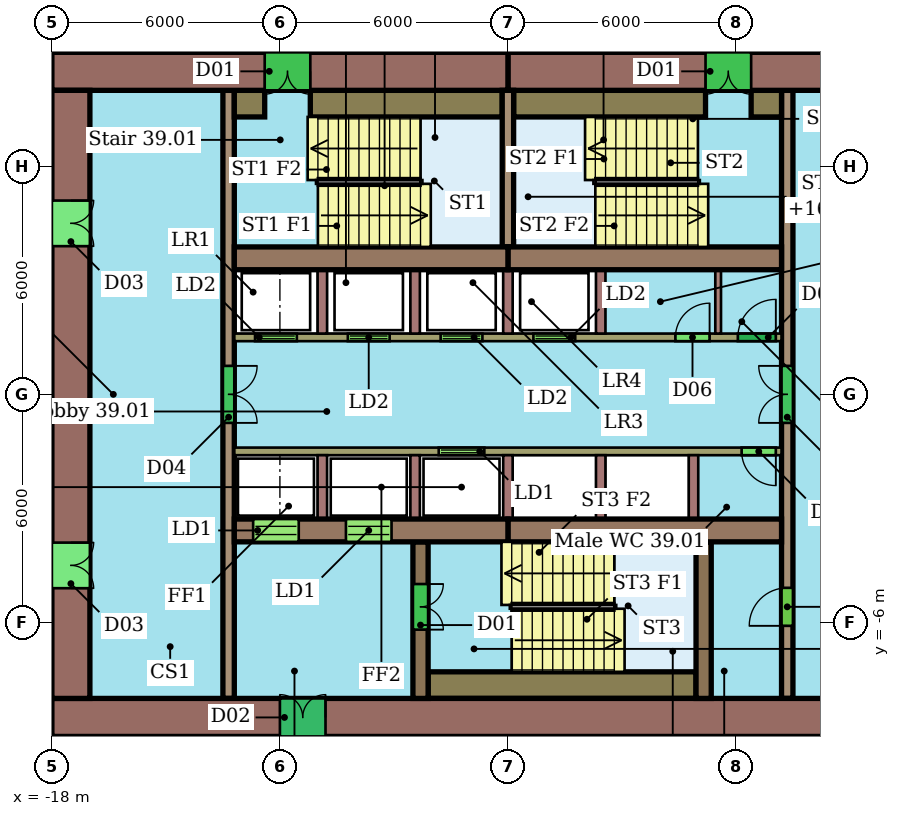
"""IFC4 building model, lengths in metres.
Left out: names, types, materials, properties, quantities, classifications, styles, units other than length and angle.
Written with IfcOpenShell. Run it as: python <this file> out.ifc"""

import sys

from ifc_helpers import new_model, si_unit, direction, frame, frame_2d, origin, place, context, subcontext, project, spatial, rectangle, extrude, element, fill, save


model = new_model("IFC4")
c1 = context("Model", 3, precision=1e-05, world=origin(), true_north=direction((0.0, 1.0)))
c2 = subcontext(c1, "Body", "Model", "MODEL_VIEW")
j1 = project(units=[si_unit("LENGTHUNIT", "METRE"), si_unit("PLANEANGLEUNIT", "RADIAN")], contexts=[c1])
p1 = place(None, origin())
s1 = spatial("IfcSite", under=j1, at=p1, CompositionType="ELEMENT")
p2 = place(p1, origin())
s2 = spatial("IfcBuilding", under=s1, at=p2, CompositionType="ELEMENT")
p3 = place(p2, frame((0.0, 0.0, 165.0)))
s3 = spatial("IfcBuildingStorey", under=s2, at=p3, CompositionType="ELEMENT", Elevation=165.0)
p4 = place(p3, frame((6.0, 8.5, 0.0), z_axis=(0.0, 0.0, 1.0), x_axis=(-1.0, 0.0, 0.0)))
e1 = element("IfcWall", 1, at=p4, inside=s3, PredefinedType="SHEAR", context=c2, shape_type="SweptSolid", body=[
    extrude(rectangle(XDim=12.0, YDim=1.0, at=frame_2d((6.0, 0.0))), origin(), (0.0, 0.0, 1.0), 3.3),
])
p5 = place(p4, frame((5.6, 0.0, 0.0)))
e2 = element("IfcOpeningElement", 2, at=p5, cuts=e1, PredefinedType="OPENING", context=c2, shape_type="SweptSolid", body=[
    extrude(rectangle(XDim=1.2, YDim=2.1, at=frame_2d((0.6, 1.05))), frame((0.0, 0.51, 0.0), z_axis=(0.0, -1.0, 0.0), x_axis=(1.0, 0.0, 0.0)), (0.0, 0.0, 1.0), 1.02),
])
p6 = place(p3, frame((-6.0, 8.5, 0.0), z_axis=(0.0, 0.0, 1.0), x_axis=(-1.0, 0.0, 0.0)))
e3 = element("IfcWall", 3, at=p6, inside=s3, PredefinedType="SHEAR", context=c2, shape_type="SweptSolid", body=[
    extrude(rectangle(XDim=12.0, YDim=1.0, at=frame_2d((6.0, 0.0))), origin(), (0.0, 0.0, 1.0), 3.3),
])
p7 = place(p6, frame((5.2, 0.0, 0.0)))
e4 = element("IfcOpeningElement", 4, at=p7, cuts=e3, PredefinedType="OPENING", context=c2, shape_type="SweptSolid", body=[
    extrude(rectangle(XDim=1.2, YDim=2.1, at=frame_2d((0.6, 1.05))), frame((0.0, 0.51, 0.0), z_axis=(0.0, -1.0, 0.0), x_axis=(1.0, 0.0, 0.0)), (0.0, 0.0, 1.0), 1.02),
])
p8 = place(p3, frame((-18.0, -8.5, 0.0), z_axis=(0.0, 0.0, 1.0), x_axis=(1.0, 0.0, 0.0)))
e5 = element("IfcWall", 5, at=p8, inside=s3, PredefinedType="SHEAR", context=c2, shape_type="SweptSolid", body=[
    extrude(rectangle(XDim=24.0, YDim=1.0, at=frame_2d((12.0, 0.0))), origin(), (0.0, 0.0, 1.0), 3.3),
])
p9 = place(p8, frame((6.0, 0.0, 0.0)))
e6 = element("IfcOpeningElement", 6, at=p9, cuts=e5, PredefinedType="OPENING", context=c2, shape_type="SweptSolid", body=[
    extrude(rectangle(XDim=1.2, YDim=2.1, at=frame_2d((0.6, 1.05))), frame((0.0, 0.51, 0.0), z_axis=(0.0, -1.0, 0.0), x_axis=(1.0, 0.0, 0.0)), (0.0, 0.0, 1.0), 1.02),
])
p10 = place(p3, frame((-17.5, 8.0, 0.0), z_axis=(0.0, 0.0, 1.0), x_axis=(0.0, -1.0, 0.0)))
e7 = element("IfcWall", 7, at=p10, inside=s3, PredefinedType="SHEAR", context=c2, shape_type="SweptSolid", body=[
    extrude(rectangle(XDim=16.0, YDim=1.0, at=frame_2d((8.0, 0.0))), origin(), (0.0, 0.0, 1.0), 3.3),
])
p11 = place(p10, frame((11.9, 0.0, 0.0)))
e8 = element("IfcOpeningElement", 8, at=p11, cuts=e7, PredefinedType="OPENING", context=c2, shape_type="SweptSolid", body=[
    extrude(rectangle(XDim=1.2, YDim=2.1, at=frame_2d((0.6, 1.05))), frame((0.0, 0.51, 0.0), z_axis=(0.0, -1.0, 0.0), x_axis=(1.0, 0.0, 0.0)), (0.0, 0.0, 1.0), 1.02),
])
p12 = place(p10, frame((2.9, 0.0, 0.0)))
e9 = element("IfcOpeningElement", 9, at=p12, cuts=e7, PredefinedType="OPENING", context=c2, shape_type="SweptSolid", body=[
    extrude(rectangle(XDim=1.2, YDim=2.1, at=frame_2d((0.6, 1.05))), frame((0.0, 0.51, 0.0), z_axis=(0.0, -1.0, 0.0), x_axis=(1.0, 0.0, 0.0)), (0.0, 0.0, 1.0), 1.02),
])
for number, where, z_axis, x_axis in (
    (10, (-13.2, 3.58, 0.0), (0.0, 0.0, 1.0), (1.0, 0.0, 0.0)),
    (11, (-6.0, 3.58, 0.0), (0.0, 0.0, 1.0), (1.0, 0.0, 0.0)),
):
    element("IfcWall", number, at=place(p3, frame(where, z_axis=z_axis, x_axis=x_axis)), inside=s3, PredefinedType="SHEAR", context=c2, shape_type="SweptSolid", body=[
        extrude(rectangle(XDim=7.2, YDim=0.6, at=frame_2d((3.6, 0.0))), origin(), (0.0, 0.0, 1.0), 3.3),
    ])
p13 = place(p3, frame((-13.2, -3.58, 0.0), z_axis=(0.0, 0.0, 1.0), x_axis=(1.0, 0.0, 0.0)))
e12 = element("IfcWall", 12, at=p13, inside=s3, PredefinedType="SHEAR", context=c2, shape_type="SweptSolid", body=[
    extrude(rectangle(XDim=7.2, YDim=0.6, at=frame_2d((3.6, 0.0))), origin(), (0.0, 0.0, 1.0), 3.3),
])
p14 = place(p13, frame((0.496, 0.0, 0.0)))
e13 = element("IfcOpeningElement", 13, at=p14, cuts=e12, PredefinedType="OPENING", context=c2, shape_type="SweptSolid", body=[
    extrude(rectangle(XDim=1.2, YDim=2.1, at=frame_2d((0.6, 1.05))), frame((0.0, 0.31, 0.0), z_axis=(0.0, -1.0, 0.0), x_axis=(1.0, 0.0, 0.0)), (0.0, 0.0, 1.0), 0.62),
])
p15 = place(p13, frame((2.938, 0.0, 0.0)))
e14 = element("IfcOpeningElement", 14, at=p15, cuts=e12, PredefinedType="OPENING", context=c2, shape_type="SweptSolid", body=[
    extrude(rectangle(XDim=1.2, YDim=2.1, at=frame_2d((0.6, 1.05))), frame((0.0, 0.31, 0.0), z_axis=(0.0, -1.0, 0.0), x_axis=(1.0, 0.0, 0.0)), (0.0, 0.0, 1.0), 0.62),
])
p16 = place(p3, frame((-6.0, -3.58, 0.0), z_axis=(0.0, 0.0, 1.0), x_axis=(1.0, 0.0, 0.0)))
e15 = element("IfcWall", 15, at=p16, inside=s3, PredefinedType="SHEAR", context=c2, shape_type="SweptSolid", body=[
    extrude(rectangle(XDim=7.2, YDim=0.6, at=frame_2d((3.6, 0.0))), origin(), (0.0, 0.0, 1.0), 3.3),
])
p17 = place(p3, frame((-13.35, 8.0, 0.0), z_axis=(0.0, 0.0, 1.0), x_axis=(0.0, -1.0, 0.0)))
e16 = element("IfcWall", 16, at=p17, inside=s3, PredefinedType="SHEAR", context=c2, shape_type="SweptSolid", body=[
    extrude(rectangle(XDim=16.0, YDim=0.3, at=frame_2d((8.0, 0.0))), origin(), (0.0, 0.0, 1.0), 3.3),
])
p18 = place(p17, frame((7.25, 0.0, 0.0)))
e17 = element("IfcOpeningElement", 17, at=p18, cuts=e16, PredefinedType="OPENING", context=c2, shape_type="SweptSolid", body=[
    extrude(rectangle(XDim=1.5, YDim=2.1, at=frame_2d((0.75, 1.05))), frame((0.0, 0.16, 0.0), z_axis=(0.0, -1.0, 0.0), x_axis=(1.0, 0.0, 0.0)), (0.0, 0.0, 1.0), 0.32),
])
p19 = place(p3, frame((1.35, -8.0, 0.0), z_axis=(0.0, 0.0, 1.0), x_axis=(0.0, 1.0, 0.0)))
e18 = element("IfcWall", 18, at=p19, inside=s3, PredefinedType="SHEAR", context=c2, shape_type="SweptSolid", body=[
    extrude(rectangle(XDim=16.0, YDim=0.3, at=frame_2d((8.0, 0.0))), origin(), (0.0, 0.0, 1.0), 3.3),
])
p20 = place(p19, frame((1.91, 0.0, 0.0)))
e19 = element("IfcOpeningElement", 19, at=p20, cuts=e18, PredefinedType="OPENING", context=c2, shape_type="SweptSolid", body=[
    extrude(rectangle(XDim=1.0, YDim=2.1, at=frame_2d((0.5, 1.05))), frame((0.0, 0.16, 0.0), z_axis=(0.0, -1.0, 0.0), x_axis=(1.0, 0.0, 0.0)), (0.0, 0.0, 1.0), 0.32),
])
p21 = place(p19, frame((7.25, 0.0, 0.0)))
e20 = element("IfcOpeningElement", 20, at=p21, cuts=e18, PredefinedType="OPENING", context=c2, shape_type="SweptSolid", body=[
    extrude(rectangle(XDim=1.5, YDim=2.1, at=frame_2d((0.75, 1.05))), frame((0.0, 0.16, 0.0), z_axis=(0.0, -1.0, 0.0), x_axis=(1.0, 0.0, 0.0)), (0.0, 0.0, 1.0), 0.32),
])
p22 = place(p3, frame((-13.2, 1.5, 0.0), z_axis=(0.0, 0.0, 1.0), x_axis=(1.0, 0.0, 0.0)))
e21 = element("IfcWall", 21, at=p22, inside=s3, PredefinedType="SHEAR", context=c2, shape_type="SweptSolid", body=[
    extrude(rectangle(XDim=14.4, YDim=0.2, at=frame_2d((7.2, 0.0))), origin(), (0.0, 0.0, 1.0), 3.3),
])
p23 = place(p22, frame((0.546, 0.0, 0.0)))
e22 = element("IfcOpeningElement", 22, at=p23, cuts=e21, PredefinedType="OPENING", context=c2, shape_type="SweptSolid", body=[
    extrude(rectangle(XDim=1.1, YDim=2.1, at=frame_2d((0.55, 1.05))), frame((0.0, 0.11, 0.0), z_axis=(0.0, -1.0, 0.0), x_axis=(1.0, 0.0, 0.0)), (0.0, 0.0, 1.0), 0.22),
])
p24 = place(p22, frame((2.988, 0.0, 0.0)))
e23 = element("IfcOpeningElement", 23, at=p24, cuts=e21, PredefinedType="OPENING", context=c2, shape_type="SweptSolid", body=[
    extrude(rectangle(XDim=1.1, YDim=2.1, at=frame_2d((0.55, 1.05))), frame((0.0, 0.11, 0.0), z_axis=(0.0, -1.0, 0.0), x_axis=(1.0, 0.0, 0.0)), (0.0, 0.0, 1.0), 0.22),
])
p25 = place(p22, frame((5.429, 0.0, 0.0)))
e24 = element("IfcOpeningElement", 24, at=p25, cuts=e21, PredefinedType="OPENING", context=c2, shape_type="SweptSolid", body=[
    extrude(rectangle(XDim=1.1, YDim=2.1, at=frame_2d((0.55, 1.05))), frame((0.0, 0.11, 0.0), z_axis=(0.0, -1.0, 0.0), x_axis=(1.0, 0.0, 0.0)), (0.0, 0.0, 1.0), 0.22),
])
p26 = place(p22, frame((7.871, 0.0, 0.0)))
e25 = element("IfcOpeningElement", 25, at=p26, cuts=e21, PredefinedType="OPENING", context=c2, shape_type="SweptSolid", body=[
    extrude(rectangle(XDim=1.1, YDim=2.1, at=frame_2d((0.55, 1.05))), frame((0.0, 0.11, 0.0), z_axis=(0.0, -1.0, 0.0), x_axis=(1.0, 0.0, 0.0)), (0.0, 0.0, 1.0), 0.22),
])
p27 = place(p22, frame((11.607, 0.0, 0.0)))
e26 = element("IfcOpeningElement", 26, at=p27, cuts=e21, PredefinedType="OPENING", context=c2, shape_type="SweptSolid", body=[
    extrude(rectangle(XDim=0.9, YDim=2.1, at=frame_2d((0.45, 1.05))), frame((0.0, 0.11, 0.0), z_axis=(0.0, -1.0, 0.0), x_axis=(1.0, 0.0, 0.0)), (0.0, 0.0, 1.0), 0.22),
])
p28 = place(p22, frame((13.25, 0.0, 0.0)))
e27 = element("IfcOpeningElement", 27, at=p28, cuts=e21, PredefinedType="OPENING", context=c2, shape_type="SweptSolid", body=[
    extrude(rectangle(XDim=1.0, YDim=2.1, at=frame_2d((0.5, 1.05))), frame((0.0, 0.11, 0.0), z_axis=(0.0, -1.0, 0.0), x_axis=(1.0, 0.0, 0.0)), (0.0, 0.0, 1.0), 0.22),
])
p29 = place(p3, frame((1.2, -1.5, 0.0), z_axis=(0.0, 0.0, 1.0), x_axis=(-1.0, 0.0, 0.0)))
e28 = element("IfcWall", 28, at=p29, inside=s3, PredefinedType="SHEAR", context=c2, shape_type="SweptSolid", body=[
    extrude(rectangle(XDim=14.4, YDim=0.2, at=frame_2d((7.2, 0.0))), origin(), (0.0, 0.0, 1.0), 3.3),
])
p30 = place(p29, frame((7.821, 0.0, 0.0)))
e29 = element("IfcOpeningElement", 29, at=p30, cuts=e28, PredefinedType="OPENING", context=c2, shape_type="SweptSolid", body=[
    extrude(rectangle(XDim=1.2, YDim=2.1, at=frame_2d((0.6, 1.05))), frame((0.0, 0.11, 0.0), z_axis=(0.0, -1.0, 0.0), x_axis=(1.0, 0.0, 0.0)), (0.0, 0.0, 1.0), 0.22),
])
p31 = place(p29, frame((0.15, 0.0, 0.0)))
e30 = element("IfcOpeningElement", 30, at=p31, cuts=e28, PredefinedType="OPENING", context=c2, shape_type="SweptSolid", body=[
    extrude(rectangle(XDim=0.9, YDim=2.1, at=frame_2d((0.45, 1.05))), frame((0.0, 0.11, 0.0), z_axis=(0.0, -1.0, 0.0), x_axis=(1.0, 0.0, 0.0)), (0.0, 0.0, 1.0), 0.22),
])
p32 = place(p3, frame((-8.3, -3.88, 0.0), z_axis=(0.0, 0.0, 1.0), x_axis=(0.0, -1.0, 0.0)))
e31 = element("IfcWall", 31, at=p32, inside=s3, PredefinedType="SHEAR", context=c2, shape_type="SweptSolid", body=[
    extrude(rectangle(XDim=4.12, YDim=0.4, at=frame_2d((2.06, 0.0))), origin(), (0.0, 0.0, 1.0), 3.3),
])
p33 = place(p32, frame((1.11, 0.0, 0.0)))
e32 = element("IfcOpeningElement", 32, at=p33, cuts=e31, PredefinedType="OPENING", context=c2, shape_type="SweptSolid", body=[
    extrude(rectangle(XDim=1.2, YDim=2.1, at=frame_2d((0.6, 1.05))), frame((0.0, 0.21, 0.0), z_axis=(0.0, -1.0, 0.0), x_axis=(1.0, 0.0, 0.0)), (0.0, 0.0, 1.0), 0.42),
])
p34 = place(p3, frame((-0.85, -3.88, 0.0), z_axis=(0.0, 0.0, 1.0), x_axis=(0.0, -1.0, 0.0)))
e33 = element("IfcWall", 33, at=p34, inside=s3, PredefinedType="SHEAR", context=c2, shape_type="SweptSolid", body=[
    extrude(rectangle(XDim=4.12, YDim=0.4, at=frame_2d((2.06, 0.0))), origin(), (0.0, 0.0, 1.0), 3.3),
])
p35 = place(p3, frame((-6.0, 3.88, 0.0), z_axis=(0.0, 0.0, 1.0), x_axis=(0.0, 1.0, 0.0)))
e34 = element("IfcWall", 34, at=p35, inside=s3, PredefinedType="SHEAR", context=c2, shape_type="SweptSolid", body=[
    extrude(rectangle(XDim=4.12, YDim=0.3, at=frame_2d((2.06, 0.0))), origin(), (0.0, 0.0, 1.0), 3.3),
])
p36 = place(p3, frame((-13.2, 7.65, 0.0), z_axis=(0.0, 0.0, 1.0), x_axis=(1.0, 0.0, 0.0)))
e35 = element("IfcWall", 35, at=p36, inside=s3, PredefinedType="SHEAR", context=c2, shape_type="SweptSolid", body=[
    extrude(rectangle(XDim=0.8, YDim=0.7, at=frame_2d((0.4, 0.0))), origin(), (0.0, 0.0, 1.0), 3.3),
])
for number, where, z_axis, x_axis in (
    (36, (-11.2, 7.65, 0.0), (0.0, 0.0, 1.0), (1.0, 0.0, 0.0)),
    (37, (-5.85, 7.65, 0.0), (0.0, 0.0, 1.0), (1.0, 0.0, 0.0)),
):
    element("IfcWall", number, at=place(p3, frame(where, z_axis=z_axis, x_axis=x_axis)), inside=s3, PredefinedType="SHEAR", context=c2, shape_type="SweptSolid", body=[
        extrude(rectangle(XDim=5.05, YDim=0.7, at=frame_2d((2.525, 0.0))), origin(), (0.0, 0.0, 1.0), 3.3),
    ])
p37 = place(p3, frame((0.4, 7.65, 0.0), z_axis=(0.0, 0.0, 1.0), x_axis=(1.0, 0.0, 0.0)))
e38 = element("IfcWall", 38, at=p37, inside=s3, PredefinedType="SHEAR", context=c2, shape_type="SweptSolid", body=[
    extrude(rectangle(XDim=0.8, YDim=0.7, at=frame_2d((0.4, 0.0))), origin(), (0.0, 0.0, 1.0), 3.3),
])
p38 = place(p3, frame((-8.1, -7.65, 0.0), z_axis=(0.0, 0.0, 1.0), x_axis=(1.0, 0.0, 0.0)))
e39 = element("IfcWall", 39, at=p38, inside=s3, PredefinedType="SHEAR", context=c2, shape_type="SweptSolid", body=[
    extrude(rectangle(XDim=7.05, YDim=0.7, at=frame_2d((3.525, 0.0))), origin(), (0.0, 0.0, 1.0), 3.3),
])
for number, where, z_axis, x_axis in (
    (40, (-10.883, 1.6, 0.0), (0.0, 0.0, 1.0), (0.0, 1.0, 0.0)),
    (41, (-8.442, 1.6, 0.0), (0.0, 0.0, 1.0), (0.0, 1.0, 0.0)),
    (42, (-6.0, 1.6, 0.0), (0.0, 0.0, 1.0), (0.0, 1.0, 0.0)),
    (43, (-3.558, 1.6, 0.0), (0.0, 0.0, 1.0), (0.0, 1.0, 0.0)),
):
    element("IfcWall", number, at=place(p3, frame(where, z_axis=z_axis, x_axis=x_axis)), inside=s3, PredefinedType="SHEAR", context=c2, shape_type="SweptSolid", body=[
        extrude(rectangle(XDim=1.68, YDim=0.25, at=frame_2d((0.84, 0.0))), origin(), (0.0, 0.0, 1.0), 3.3),
    ])
p39 = place(p3, frame((-0.468, 1.6, 0.0), z_axis=(0.0, 0.0, 1.0), x_axis=(0.0, 1.0, 0.0)))
e44 = element("IfcWall", 44, at=p39, inside=s3, PredefinedType="PARTITIONING", context=c2, shape_type="SweptSolid", body=[
    extrude(rectangle(XDim=1.68, YDim=0.15, at=frame_2d((0.84, 0.0))), origin(), (0.0, 0.0, 1.0), 3.3),
])
for number, where, z_axis, x_axis in (
    (45, (-10.883, -1.6, 0.0), (0.0, 0.0, 1.0), (0.0, -1.0, 0.0)),
    (46, (-8.442, -1.6, 0.0), (0.0, 0.0, 1.0), (0.0, -1.0, 0.0)),
    (47, (-6.0, -1.6, 0.0), (0.0, 0.0, 1.0), (0.0, -1.0, 0.0)),
    (48, (-3.558, -1.6, 0.0), (0.0, 0.0, 1.0), (0.0, -1.0, 0.0)),
    (49, (-1.117, -1.6, 0.0), (0.0, 0.0, 1.0), (0.0, -1.0, 0.0)),
):
    element("IfcWall", number, at=place(p3, frame(where, z_axis=z_axis, x_axis=x_axis)), inside=s3, PredefinedType="SHEAR", context=c2, shape_type="SweptSolid", body=[
        extrude(rectangle(XDim=1.68, YDim=0.25, at=frame_2d((0.84, 0.0))), origin(), (0.0, 0.0, 1.0), 3.3),
    ])
p40 = place(p5, origin())
e50 = element("IfcDoor", 50, at=p40, inside=s3, OperationType="DOUBLE_DOOR_SINGLE_SWING", PredefinedType="NOTDEFINED", context=c2, shape_type="SweptSolid", body=[
    extrude(rectangle(XDim=1.2, YDim=2.1, at=frame_2d((0.6, 1.05))), frame((0.0, 0.025, 0.0), z_axis=(0.0, -1.0, 0.0), x_axis=(1.0, 0.0, 0.0)), (0.0, 0.0, 1.0), 0.05),
])
fill(e2, e50)
p41 = place(p7, origin())
e51 = element("IfcDoor", 51, at=p41, inside=s3, OperationType="DOUBLE_DOOR_SINGLE_SWING", PredefinedType="NOTDEFINED", context=c2, shape_type="SweptSolid", body=[
    extrude(rectangle(XDim=1.2, YDim=2.1, at=frame_2d((0.6, 1.05))), frame((0.0, 0.025, 0.0), z_axis=(0.0, -1.0, 0.0), x_axis=(1.0, 0.0, 0.0)), (0.0, 0.0, 1.0), 0.05),
])
fill(e4, e51)
p42 = place(p9, origin())
e52 = element("IfcDoor", 52, at=p42, inside=s3, OperationType="DOUBLE_DOOR_SINGLE_SWING", PredefinedType="NOTDEFINED", context=c2, shape_type="SweptSolid", body=[
    extrude(rectangle(XDim=1.2, YDim=2.1, at=frame_2d((0.6, 1.05))), frame((0.0, 0.025, 0.0), z_axis=(0.0, -1.0, 0.0), x_axis=(1.0, 0.0, 0.0)), (0.0, 0.0, 1.0), 0.05),
])
fill(e6, e52)
p43 = place(p11, origin())
e53 = element("IfcDoor", 53, at=p43, inside=s3, OperationType="DOUBLE_DOOR_SINGLE_SWING", PredefinedType="NOTDEFINED", context=c2, shape_type="SweptSolid", body=[
    extrude(rectangle(XDim=1.2, YDim=2.1, at=frame_2d((0.6, 1.05))), frame((0.0, 0.025, 0.0), z_axis=(0.0, -1.0, 0.0), x_axis=(1.0, 0.0, 0.0)), (0.0, 0.0, 1.0), 0.05),
])
fill(e8, e53)
p44 = place(p12, origin())
e54 = element("IfcDoor", 54, at=p44, inside=s3, OperationType="DOUBLE_DOOR_SINGLE_SWING", PredefinedType="NOTDEFINED", context=c2, shape_type="SweptSolid", body=[
    extrude(rectangle(XDim=1.2, YDim=2.1, at=frame_2d((0.6, 1.05))), frame((0.0, 0.025, 0.0), z_axis=(0.0, -1.0, 0.0), x_axis=(1.0, 0.0, 0.0)), (0.0, 0.0, 1.0), 0.05),
])
fill(e9, e54)
p45 = place(p14, origin())
e55 = element("IfcDoor", 55, at=p45, inside=s3, OperationType="DOUBLE_DOOR_SLIDING", PredefinedType="NOTDEFINED", context=c2, shape_type="SweptSolid", body=[
    extrude(rectangle(XDim=1.2, YDim=2.1, at=frame_2d((0.6, 1.05))), frame((0.0, 0.025, 0.0), z_axis=(0.0, -1.0, 0.0), x_axis=(1.0, 0.0, 0.0)), (0.0, 0.0, 1.0), 0.05),
])
fill(e13, e55)
p46 = place(p15, origin())
e56 = element("IfcDoor", 56, at=p46, inside=s3, OperationType="DOUBLE_DOOR_SLIDING", PredefinedType="NOTDEFINED", context=c2, shape_type="SweptSolid", body=[
    extrude(rectangle(XDim=1.2, YDim=2.1, at=frame_2d((0.6, 1.05))), frame((0.0, 0.025, 0.0), z_axis=(0.0, -1.0, 0.0), x_axis=(1.0, 0.0, 0.0)), (0.0, 0.0, 1.0), 0.05),
])
fill(e14, e56)
p47 = place(p18, origin())
e57 = element("IfcDoor", 57, at=p47, inside=s3, OperationType="DOUBLE_DOOR_SINGLE_SWING", PredefinedType="NOTDEFINED", context=c2, shape_type="SweptSolid", body=[
    extrude(rectangle(XDim=1.5, YDim=2.1, at=frame_2d((0.75, 1.05))), frame((0.0, 0.025, 0.0), z_axis=(0.0, -1.0, 0.0), x_axis=(1.0, 0.0, 0.0)), (0.0, 0.0, 1.0), 0.05),
])
fill(e17, e57)
p48 = place(p20, origin())
e58 = element("IfcDoor", 58, at=p48, inside=s3, OperationType="SINGLE_SWING_LEFT", PredefinedType="NOTDEFINED", context=c2, shape_type="SweptSolid", body=[
    extrude(rectangle(XDim=1.0, YDim=2.1, at=frame_2d((0.5, 1.05))), frame((0.0, 0.025, 0.0), z_axis=(0.0, -1.0, 0.0), x_axis=(1.0, 0.0, 0.0)), (0.0, 0.0, 1.0), 0.05),
])
fill(e19, e58)
p49 = place(p21, origin())
e59 = element("IfcDoor", 59, at=p49, inside=s3, OperationType="DOUBLE_DOOR_SINGLE_SWING", PredefinedType="NOTDEFINED", context=c2, shape_type="SweptSolid", body=[
    extrude(rectangle(XDim=1.5, YDim=2.1, at=frame_2d((0.75, 1.05))), frame((0.0, 0.025, 0.0), z_axis=(0.0, -1.0, 0.0), x_axis=(1.0, 0.0, 0.0)), (0.0, 0.0, 1.0), 0.05),
])
fill(e20, e59)
p50 = place(p23, origin())
e60 = element("IfcDoor", 60, at=p50, inside=s3, OperationType="DOUBLE_DOOR_SLIDING", PredefinedType="NOTDEFINED", context=c2, shape_type="SweptSolid", body=[
    extrude(rectangle(XDim=1.1, YDim=2.1, at=frame_2d((0.55, 1.05))), frame((0.0, 0.025, 0.0), z_axis=(0.0, -1.0, 0.0), x_axis=(1.0, 0.0, 0.0)), (0.0, 0.0, 1.0), 0.05),
])
fill(e22, e60)
p51 = place(p24, origin())
e61 = element("IfcDoor", 61, at=p51, inside=s3, OperationType="DOUBLE_DOOR_SLIDING", PredefinedType="NOTDEFINED", context=c2, shape_type="SweptSolid", body=[
    extrude(rectangle(XDim=1.1, YDim=2.1, at=frame_2d((0.55, 1.05))), frame((0.0, 0.025, 0.0), z_axis=(0.0, -1.0, 0.0), x_axis=(1.0, 0.0, 0.0)), (0.0, 0.0, 1.0), 0.05),
])
fill(e23, e61)
p52 = place(p25, origin())
e62 = element("IfcDoor", 62, at=p52, inside=s3, OperationType="DOUBLE_DOOR_SLIDING", PredefinedType="NOTDEFINED", context=c2, shape_type="SweptSolid", body=[
    extrude(rectangle(XDim=1.1, YDim=2.1, at=frame_2d((0.55, 1.05))), frame((0.0, 0.025, 0.0), z_axis=(0.0, -1.0, 0.0), x_axis=(1.0, 0.0, 0.0)), (0.0, 0.0, 1.0), 0.05),
])
fill(e24, e62)
p53 = place(p26, origin())
e63 = element("IfcDoor", 63, at=p53, inside=s3, OperationType="DOUBLE_DOOR_SLIDING", PredefinedType="NOTDEFINED", context=c2, shape_type="SweptSolid", body=[
    extrude(rectangle(XDim=1.1, YDim=2.1, at=frame_2d((0.55, 1.05))), frame((0.0, 0.025, 0.0), z_axis=(0.0, -1.0, 0.0), x_axis=(1.0, 0.0, 0.0)), (0.0, 0.0, 1.0), 0.05),
])
fill(e25, e63)
p54 = place(p27, origin())
e64 = element("IfcDoor", 64, at=p54, inside=s3, OperationType="SINGLE_SWING_RIGHT", PredefinedType="NOTDEFINED", context=c2, shape_type="SweptSolid", body=[
    extrude(rectangle(XDim=0.9, YDim=2.1, at=frame_2d((0.45, 1.05))), frame((0.0, 0.025, 0.0), z_axis=(0.0, -1.0, 0.0), x_axis=(1.0, 0.0, 0.0)), (0.0, 0.0, 1.0), 0.05),
])
fill(e26, e64)
p55 = place(p28, origin())
e65 = element("IfcDoor", 65, at=p55, inside=s3, OperationType="SINGLE_SWING_RIGHT", PredefinedType="NOTDEFINED", context=c2, shape_type="SweptSolid", body=[
    extrude(rectangle(XDim=1.0, YDim=2.1, at=frame_2d((0.5, 1.05))), frame((0.0, 0.025, 0.0), z_axis=(0.0, -1.0, 0.0), x_axis=(1.0, 0.0, 0.0)), (0.0, 0.0, 1.0), 0.05),
])
fill(e27, e65)
p56 = place(p30, origin())
e66 = element("IfcDoor", 66, at=p56, inside=s3, OperationType="DOUBLE_DOOR_SLIDING", PredefinedType="NOTDEFINED", context=c2, shape_type="SweptSolid", body=[
    extrude(rectangle(XDim=1.2, YDim=2.1, at=frame_2d((0.6, 1.05))), frame((0.0, 0.025, 0.0), z_axis=(0.0, -1.0, 0.0), x_axis=(1.0, 0.0, 0.0)), (0.0, 0.0, 1.0), 0.05),
])
fill(e29, e66)
p57 = place(p31, origin())
e67 = element("IfcDoor", 67, at=p57, inside=s3, OperationType="SINGLE_SWING_LEFT", PredefinedType="NOTDEFINED", context=c2, shape_type="SweptSolid", body=[
    extrude(rectangle(XDim=0.9, YDim=2.1, at=frame_2d((0.45, 1.05))), frame((0.0, 0.025, 0.0), z_axis=(0.0, -1.0, 0.0), x_axis=(1.0, 0.0, 0.0)), (0.0, 0.0, 1.0), 0.05),
])
fill(e30, e67)
p58 = place(p33, origin())
e68 = element("IfcDoor", 68, at=p58, inside=s3, OperationType="DOUBLE_DOOR_SINGLE_SWING", PredefinedType="NOTDEFINED", context=c2, shape_type="SweptSolid", body=[
    extrude(rectangle(XDim=1.2, YDim=2.1, at=frame_2d((0.6, 1.05))), frame((0.0, 0.025, 0.0), z_axis=(0.0, -1.0, 0.0), x_axis=(1.0, 0.0, 0.0)), (0.0, 0.0, 1.0), 0.05),
])
fill(e32, e68)
save(model, sys.argv[1])
